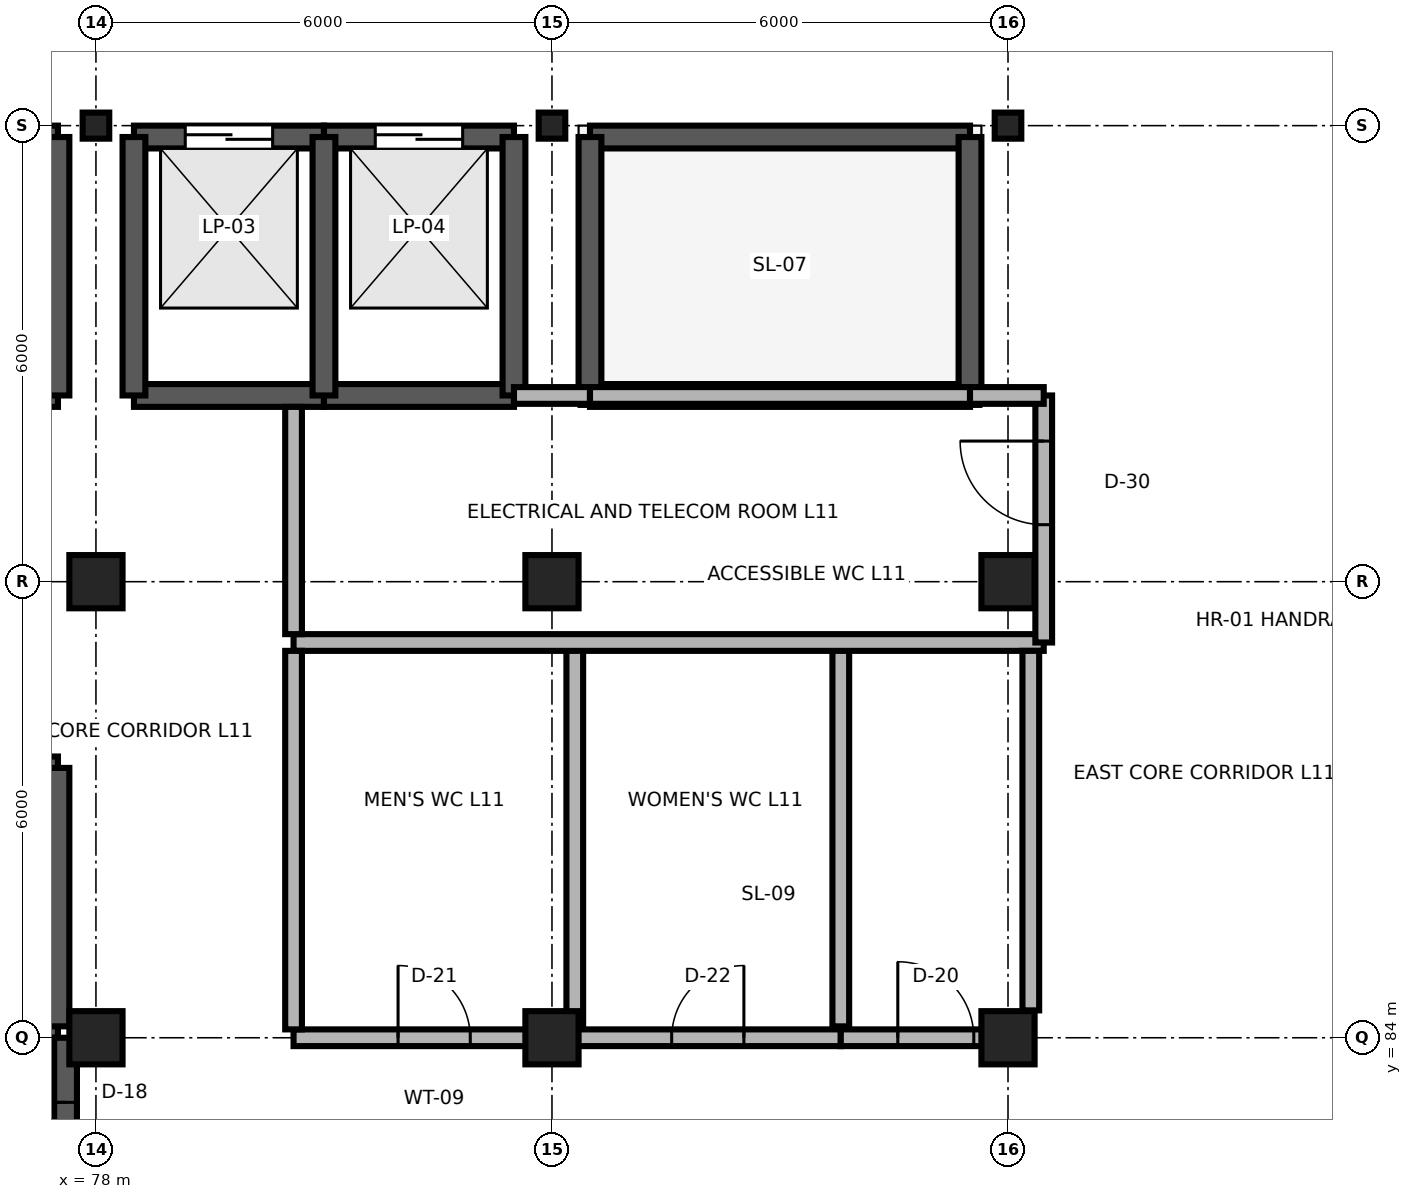
"""IFC4 building model, lengths in metres.
Left out: names, types, materials, properties, quantities, classifications, styles, units other than length and angle.
Written with IfcOpenShell. Run it as: python <this file> out.ifc"""

import sys

from ifc_helpers import new_model, si_unit, direction, frame, frame_2d, origin, origin_2d, place, context, subcontext, project, spatial, rectangle, i_section, extrude, element, fill, save


model = new_model("IFC4")
c1 = context("Model", 3, precision=1e-05, world=origin(), true_north=direction((0.0, 1.0)))
c2 = subcontext(c1, "Body", "Model", "MODEL_VIEW")
j1 = project(units=[si_unit("LENGTHUNIT", "METRE"), si_unit("PLANEANGLEUNIT", "RADIAN")], contexts=[c1])
p1 = place(None, origin())
s1 = spatial("IfcSite", under=j1, at=p1, CompositionType="ELEMENT")
p2 = place(p1, origin())
s2 = spatial("IfcBuilding", under=s1, at=p2, CompositionType="ELEMENT")
p3 = place(p2, frame((0.0, 0.0, 44.4)))
s3 = spatial("IfcBuildingStorey", under=s2, at=p3, CompositionType="ELEMENT", Elevation=44.4)
for number, where, z_axis, x_axis in (
    (1, (78.0, 84.0, 0.0), (0.0, 0.0, 1.0), (1.0, 0.0, 0.0)),
    (2, (84.0, 84.0, 0.0), (0.0, 0.0, 1.0), (1.0, 0.0, 0.0)),
    (3, (90.0, 84.0, 0.0), (0.0, 0.0, 1.0), (1.0, 0.0, 0.0)),
    (4, (78.0, 90.0, 0.0), (0.0, 0.0, 1.0), (1.0, 0.0, 0.0)),
    (5, (84.0, 90.0, 0.0), (0.0, 0.0, 1.0), (1.0, 0.0, 0.0)),
    (6, (90.0, 90.0, 0.0), (0.0, 0.0, 1.0), (1.0, 0.0, 0.0)),
):
    element("IfcColumn", number, at=place(p3, frame(where, z_axis=z_axis, x_axis=x_axis)), inside=s3, PredefinedType="COLUMN", context=c2, shape_type="SweptSolid", body=[
        extrude(rectangle(XDim=0.7, YDim=0.7, at=origin_2d()), origin(), (0.0, 0.0, 1.0), 3.9),
    ])
for number, where, z_axis, x_axis in (
    (7, (78.0, 96.0, 0.0), (0.0, 0.0, 1.0), (1.0, 0.0, 0.0)),
    (8, (84.0, 96.0, 0.0), (0.0, 0.0, 1.0), (1.0, 0.0, 0.0)),
    (9, (90.0, 96.0, 0.0), (0.0, 0.0, 1.0), (1.0, 0.0, 0.0)),
):
    element("IfcColumn", number, at=place(p3, frame(where, z_axis=z_axis, x_axis=x_axis)), inside=s3, PredefinedType="COLUMN", context=c2, shape_type="SweptSolid", body=[
        extrude(i_section(OverallWidth=0.35, OverallDepth=0.343, WebThickness=0.01, FlangeThickness=0.015, FilletRadius=0.02, at=origin_2d()), origin(), (0.0, 0.0, 1.0), 3.9),
    ])
p4 = place(p3, frame((75.0, 84.15, 0.0), z_axis=(0.0, 0.0, 1.0), x_axis=(1.0, 0.0, 0.0)))
e10 = element("IfcWall", 10, at=p4, inside=s3, PredefinedType="SHEAR", context=c2, shape_type="SweptSolid", body=[
    extrude(rectangle(XDim=2.5, YDim=0.3, at=frame_2d((1.25, 0.0))), origin(), (0.0, 0.0, 1.0), 3.74),
])
p5 = place(p4, frame((0.7, 0.0, 0.0)))
e11 = element("IfcOpeningElement", 11, at=p5, cuts=e10, PredefinedType="OPENING", context=c2, shape_type="SweptSolid", body=[
    extrude(rectangle(XDim=1.1, YDim=2.1, at=frame_2d((0.55, 1.05))), frame((0.0, 0.165, 0.0), z_axis=(0.0, -1.0, 0.0), x_axis=(1.0, 0.0, 0.0)), (0.0, 0.0, 1.0), 0.33),
])
p6 = place(p3, frame((75.0, 87.55, 0.0), z_axis=(0.0, 0.0, 1.0), x_axis=(1.0, 0.0, 0.0)))
e12 = element("IfcWall", 12, at=p6, inside=s3, PredefinedType="SHEAR", context=c2, shape_type="SweptSolid", body=[
    extrude(rectangle(XDim=2.5, YDim=0.3, at=frame_2d((1.25, 0.0))), origin(), (0.0, 0.0, 1.0), 3.74),
])
p7 = place(p3, frame((77.5, 84.15, 0.0), z_axis=(0.0, 0.0, 1.0), x_axis=(0.0, 1.0, 0.0)))
e13 = element("IfcWall", 13, at=p7, inside=s3, PredefinedType="SHEAR", context=c2, shape_type="SweptSolid", body=[
    extrude(rectangle(XDim=3.4, YDim=0.3, at=frame_2d((1.7, 0.0))), origin(), (0.0, 0.0, 1.0), 3.74),
])
p8 = place(p3, frame((75.0, 95.85, 0.0), z_axis=(0.0, 0.0, 1.0), x_axis=(1.0, 0.0, 0.0)))
e14 = element("IfcWall", 14, at=p8, inside=s3, PredefinedType="SHEAR", context=c2, shape_type="SweptSolid", body=[
    extrude(rectangle(XDim=2.5, YDim=0.3, at=frame_2d((1.25, 0.0))), origin(), (0.0, 0.0, 1.0), 3.74),
])
p9 = place(p8, frame((0.675, 0.0, 0.0)))
e15 = element("IfcOpeningElement", 15, at=p9, cuts=e14, PredefinedType="OPENING", context=c2, shape_type="SweptSolid", body=[
    extrude(rectangle(XDim=1.15, YDim=2.15, at=frame_2d((0.575, 1.075))), frame((0.0, 0.165, 0.0), z_axis=(0.0, -1.0, 0.0), x_axis=(1.0, 0.0, 0.0)), (0.0, 0.0, 1.0), 0.33),
])
p10 = place(p3, frame((75.0, 92.45, 0.0), z_axis=(0.0, 0.0, 1.0), x_axis=(1.0, 0.0, 0.0)))
e16 = element("IfcWall", 16, at=p10, inside=s3, PredefinedType="SHEAR", context=c2, shape_type="SweptSolid", body=[
    extrude(rectangle(XDim=2.5, YDim=0.3, at=frame_2d((1.25, 0.0))), origin(), (0.0, 0.0, 1.0), 3.74),
])
p11 = place(p3, frame((77.5, 92.45, 0.0), z_axis=(0.0, 0.0, 1.0), x_axis=(0.0, 1.0, 0.0)))
e17 = element("IfcWall", 17, at=p11, inside=s3, PredefinedType="SHEAR", context=c2, shape_type="SweptSolid", body=[
    extrude(rectangle(XDim=3.4, YDim=0.3, at=frame_2d((1.7, 0.0))), origin(), (0.0, 0.0, 1.0), 3.74),
])
p12 = place(p3, frame((78.5, 95.85, 0.0), z_axis=(0.0, 0.0, 1.0), x_axis=(1.0, 0.0, 0.0)))
e18 = element("IfcWall", 18, at=p12, inside=s3, PredefinedType="SHEAR", context=c2, shape_type="SweptSolid", body=[
    extrude(rectangle(XDim=2.5, YDim=0.3, at=frame_2d((1.25, 0.0))), origin(), (0.0, 0.0, 1.0), 3.74),
])
p13 = place(p12, frame((0.675, 0.0, 0.0)))
e19 = element("IfcOpeningElement", 19, at=p13, cuts=e18, PredefinedType="OPENING", context=c2, shape_type="SweptSolid", body=[
    extrude(rectangle(XDim=1.15, YDim=2.15, at=frame_2d((0.575, 1.075))), frame((0.0, 0.165, 0.0), z_axis=(0.0, -1.0, 0.0), x_axis=(1.0, 0.0, 0.0)), (0.0, 0.0, 1.0), 0.33),
])
p14 = place(p3, frame((78.5, 92.45, 0.0), z_axis=(0.0, 0.0, 1.0), x_axis=(1.0, 0.0, 0.0)))
e20 = element("IfcWall", 20, at=p14, inside=s3, PredefinedType="SHEAR", context=c2, shape_type="SweptSolid", body=[
    extrude(rectangle(XDim=2.5, YDim=0.3, at=frame_2d((1.25, 0.0))), origin(), (0.0, 0.0, 1.0), 3.74),
])
p15 = place(p3, frame((78.5, 92.45, 0.0), z_axis=(0.0, 0.0, 1.0), x_axis=(0.0, 1.0, 0.0)))
e21 = element("IfcWall", 21, at=p15, inside=s3, PredefinedType="SHEAR", context=c2, shape_type="SweptSolid", body=[
    extrude(rectangle(XDim=3.4, YDim=0.3, at=frame_2d((1.7, 0.0))), origin(), (0.0, 0.0, 1.0), 3.74),
])
p16 = place(p3, frame((81.0, 95.85, 0.0), z_axis=(0.0, 0.0, 1.0), x_axis=(1.0, 0.0, 0.0)))
e22 = element("IfcWall", 22, at=p16, inside=s3, PredefinedType="SHEAR", context=c2, shape_type="SweptSolid", body=[
    extrude(rectangle(XDim=2.5, YDim=0.3, at=frame_2d((1.25, 0.0))), origin(), (0.0, 0.0, 1.0), 3.74),
])
p17 = place(p16, frame((0.675, 0.0, 0.0)))
e23 = element("IfcOpeningElement", 23, at=p17, cuts=e22, PredefinedType="OPENING", context=c2, shape_type="SweptSolid", body=[
    extrude(rectangle(XDim=1.15, YDim=2.15, at=frame_2d((0.575, 1.075))), frame((0.0, 0.165, 0.0), z_axis=(0.0, -1.0, 0.0), x_axis=(1.0, 0.0, 0.0)), (0.0, 0.0, 1.0), 0.33),
])
p18 = place(p3, frame((81.0, 92.45, 0.0), z_axis=(0.0, 0.0, 1.0), x_axis=(1.0, 0.0, 0.0)))
e24 = element("IfcWall", 24, at=p18, inside=s3, PredefinedType="SHEAR", context=c2, shape_type="SweptSolid", body=[
    extrude(rectangle(XDim=2.5, YDim=0.3, at=frame_2d((1.25, 0.0))), origin(), (0.0, 0.0, 1.0), 3.74),
])
for number, where, z_axis, x_axis in (
    (25, (81.0, 92.45, 0.0), (0.0, 0.0, 1.0), (0.0, 1.0, 0.0)),
    (26, (83.5, 92.45, 0.0), (0.0, 0.0, 1.0), (0.0, 1.0, 0.0)),
):
    element("IfcWall", number, at=place(p3, frame(where, z_axis=z_axis, x_axis=x_axis)), inside=s3, PredefinedType="SHEAR", context=c2, shape_type="SweptSolid", body=[
        extrude(rectangle(XDim=3.4, YDim=0.3, at=frame_2d((1.7, 0.0))), origin(), (0.0, 0.0, 1.0), 3.74),
    ])
for number, where, z_axis, x_axis in (
    (27, (84.5, 92.45, -0.16), (0.0, 0.0, 1.0), (1.0, 0.0, 0.0)),
    (28, (84.5, 95.85, -0.16), (0.0, 0.0, 1.0), (1.0, 0.0, 0.0)),
):
    element("IfcWall", number, at=place(p3, frame(where, z_axis=z_axis, x_axis=x_axis)), inside=s3, PredefinedType="SHEAR", context=c2, shape_type="SweptSolid", body=[
        extrude(rectangle(XDim=5.0, YDim=0.3, at=frame_2d((2.5, 0.0))), origin(), (0.0, 0.0, 1.0), 0.96),
    ])
for number, where, z_axis, x_axis in (
    (29, (84.5, 92.45, -0.16), (0.0, 0.0, 1.0), (0.0, 1.0, 0.0)),
    (30, (89.5, 92.45, -0.16), (0.0, 0.0, 1.0), (0.0, 1.0, 0.0)),
):
    element("IfcWall", number, at=place(p3, frame(where, z_axis=z_axis, x_axis=x_axis)), inside=s3, PredefinedType="SHEAR", context=c2, shape_type="SweptSolid", body=[
        extrude(rectangle(XDim=3.4, YDim=0.3, at=frame_2d((1.7, 0.0))), origin(), (0.0, 0.0, 1.0), 0.96),
    ])
p19 = place(p3, frame((77.6, 81.0, 0.0), z_axis=(0.0, 0.0, 1.0), x_axis=(0.0, 1.0, 0.0)))
e31 = element("IfcWall", 31, at=p19, inside=s3, PredefinedType="SHEAR", context=c2, shape_type="SweptSolid", body=[
    extrude(rectangle(XDim=3.0, YDim=0.3, at=frame_2d((1.5, 0.0))), origin(), (0.0, 0.0, 1.0), 3.74),
])
p20 = place(p19, frame((0.85, 0.0, 0.0)))
e32 = element("IfcOpeningElement", 32, at=p20, cuts=e31, PredefinedType="OPENING", context=c2, shape_type="SweptSolid", body=[
    extrude(rectangle(XDim=1.3, YDim=2.2, at=frame_2d((0.65, 1.1))), frame((0.0, 0.165, 0.0), z_axis=(0.0, -1.0, 0.0), x_axis=(1.0, 0.0, 0.0)), (0.0, 0.0, 1.0), 0.33),
])
p21 = place(p3, frame((80.6, 84.0, 0.0), z_axis=(0.0, 0.0, 1.0), x_axis=(1.0, 0.0, 0.0)))
e33 = element("IfcWall", 33, at=p21, inside=s3, PredefinedType="PARTITIONING", context=c2, shape_type="SweptSolid", body=[
    extrude(rectangle(XDim=3.7, YDim=0.22, at=frame_2d((1.85, 0.0))), origin(), (0.0, 0.0, 1.0), 3.348),
])
p22 = place(p21, frame((1.375, 0.0, 0.0)))
e34 = element("IfcOpeningElement", 34, at=p22, cuts=e33, PredefinedType="OPENING", context=c2, shape_type="SweptSolid", body=[
    extrude(rectangle(XDim=0.95, YDim=2.15, at=frame_2d((0.475, 1.075))), frame((0.0, 0.125, 0.0), z_axis=(0.0, -1.0, 0.0), x_axis=(1.0, 0.0, 0.0)), (0.0, 0.0, 1.0), 0.25),
])
p23 = place(p3, frame((84.3, 84.0, 0.0), z_axis=(0.0, 0.0, 1.0), x_axis=(1.0, 0.0, 0.0)))
e35 = element("IfcWall", 35, at=p23, inside=s3, PredefinedType="PARTITIONING", context=c2, shape_type="SweptSolid", body=[
    extrude(rectangle(XDim=3.5, YDim=0.22, at=frame_2d((1.75, 0.0))), origin(), (0.0, 0.0, 1.0), 3.348),
])
p24 = place(p23, frame((1.275, 0.0, 0.0)))
e36 = element("IfcOpeningElement", 36, at=p24, cuts=e35, PredefinedType="OPENING", context=c2, shape_type="SweptSolid", body=[
    extrude(rectangle(XDim=0.95, YDim=2.1, at=frame_2d((0.475, 1.05))), frame((0.0, 0.125, 0.0), z_axis=(0.0, -1.0, 0.0), x_axis=(1.0, 0.0, 0.0)), (0.0, 0.0, 1.0), 0.25),
])
p25 = place(p3, frame((87.8, 84.0, 0.0), z_axis=(0.0, 0.0, 1.0), x_axis=(1.0, 0.0, 0.0)))
e37 = element("IfcWall", 37, at=p25, inside=s3, PredefinedType="PARTITIONING", context=c2, shape_type="SweptSolid", body=[
    extrude(rectangle(XDim=2.5, YDim=0.22, at=frame_2d((1.25, 0.0))), origin(), (0.0, 0.0, 1.0), 3.348),
])
p26 = place(p25, frame((0.75, 0.0, 0.0)))
e38 = element("IfcOpeningElement", 38, at=p26, cuts=e37, PredefinedType="OPENING", context=c2, shape_type="SweptSolid", body=[
    extrude(rectangle(XDim=1.0, YDim=2.15, at=frame_2d((0.5, 1.075))), frame((0.0, 0.125, 0.0), z_axis=(0.0, -1.0, 0.0), x_axis=(1.0, 0.0, 0.0)), (0.0, 0.0, 1.0), 0.25),
])
for number, where, z_axis, x_axis in (
    (39, (84.3, 84.15, 0.0), (0.0, 0.0, 1.0), (0.0, 1.0, 0.0)),
    (40, (87.8, 84.15, 0.0), (0.0, 0.0, 1.0), (0.0, 1.0, 0.0)),
):
    element("IfcWall", number, at=place(p3, frame(where, z_axis=z_axis, x_axis=x_axis)), inside=s3, PredefinedType="PARTITIONING", context=c2, shape_type="SweptSolid", body=[
        extrude(rectangle(XDim=5.0, YDim=0.22, at=frame_2d((2.5, 0.0))), origin(), (0.0, 0.0, 1.0), 3.74),
    ])
p27 = place(p3, frame((80.6, 89.2, 0.0), z_axis=(0.0, 0.0, 1.0), x_axis=(1.0, 0.0, 0.0)))
e41 = element("IfcWall", 41, at=p27, inside=s3, PredefinedType="PARTITIONING", context=c2, shape_type="SweptSolid", body=[
    extrude(rectangle(XDim=9.87, YDim=0.22, at=frame_2d((4.935, 0.0))), origin(), (0.0, 0.0, 1.0), 3.74),
])
p28 = place(p3, frame((90.47, 89.2, 0.0), z_axis=(0.0, 0.0, 1.0), x_axis=(0.0, 1.0, 0.0)))
e42 = element("IfcWall", 42, at=p28, inside=s3, PredefinedType="PARTITIONING", context=c2, shape_type="SweptSolid", body=[
    extrude(rectangle(XDim=3.25, YDim=0.22, at=frame_2d((1.625, 0.0))), origin(), (0.0, 0.0, 1.0), 3.74),
])
p29 = place(p28, frame((1.55, 0.0, 0.0)))
e43 = element("IfcOpeningElement", 43, at=p29, cuts=e42, PredefinedType="OPENING", context=c2, shape_type="SweptSolid", body=[
    extrude(rectangle(XDim=1.1, YDim=2.15, at=frame_2d((0.55, 1.075))), frame((0.0, 0.125, 0.0), z_axis=(0.0, -1.0, 0.0), x_axis=(1.0, 0.0, 0.0)), (0.0, 0.0, 1.0), 0.25),
])
p30 = place(p3, frame((80.6, 84.11, 0.0), z_axis=(0.0, 0.0, 1.0), x_axis=(0.0, 1.0, 0.0)))
e44 = element("IfcWall", 44, at=p30, inside=s3, PredefinedType="PARTITIONING", context=c2, shape_type="SweptSolid", body=[
    extrude(rectangle(XDim=4.98, YDim=0.22, at=frame_2d((2.49, 0.0))), origin(), (0.0, 0.0, 1.0), 3.74),
])
p31 = place(p3, frame((90.3, 84.36, 0.0), z_axis=(0.0, 0.0, 1.0), x_axis=(0.0, 1.0, 0.0)))
e45 = element("IfcWall", 45, at=p31, inside=s3, PredefinedType="PARTITIONING", context=c2, shape_type="SweptSolid", body=[
    extrude(rectangle(XDim=4.73, YDim=0.22, at=frame_2d((2.365, 0.0))), origin(), (0.0, 0.0, 1.0), 3.74),
])
p32 = place(p3, frame((80.6, 89.31, 0.0), z_axis=(0.0, 0.0, 1.0), x_axis=(0.0, 1.0, 0.0)))
e46 = element("IfcWall", 46, at=p32, inside=s3, PredefinedType="PARTITIONING", context=c2, shape_type="SweptSolid", body=[
    extrude(rectangle(XDim=2.99, YDim=0.22, at=frame_2d((1.495, 0.0))), origin(), (0.0, 0.0, 1.0), 3.74),
])
p33 = place(p3, frame((83.5, 92.45, 0.0), z_axis=(0.0, 0.0, 1.0), x_axis=(1.0, 0.0, 0.0)))
e47 = element("IfcWall", 47, at=p33, inside=s3, PredefinedType="PARTITIONING", context=c2, shape_type="SweptSolid", body=[
    extrude(rectangle(XDim=1.0, YDim=0.22, at=frame_2d((0.5, 0.0))), origin(), (0.0, 0.0, 1.0), 3.74),
])
p34 = place(p3, frame((84.5, 92.45, 0.8), z_axis=(0.0, 0.0, 1.0), x_axis=(1.0, 0.0, 0.0)))
e48 = element("IfcWall", 48, at=p34, inside=s3, PredefinedType="PARTITIONING", context=c2, shape_type="SweptSolid", body=[
    extrude(rectangle(XDim=5.0, YDim=0.22, at=frame_2d((2.5, 0.0))), origin(), (0.0, 0.0, 1.0), 2.94),
])
p35 = place(p3, frame((89.5, 92.45, 0.0), z_axis=(0.0, 0.0, 1.0), x_axis=(1.0, 0.0, 0.0)))
e49 = element("IfcWall", 49, at=p35, inside=s3, PredefinedType="PARTITIONING", context=c2, shape_type="SweptSolid", body=[
    extrude(rectangle(XDim=0.97, YDim=0.22, at=frame_2d((0.485, 0.0))), origin(), (0.0, 0.0, 1.0), 3.74),
])
p36 = place(p13, origin())
e50 = element("IfcDoor", 50, at=p36, inside=s3, OperationType="DOUBLE_DOOR_SLIDING", PredefinedType="DOOR", context=c2, shape_type="SweptSolid", body=[
    extrude(rectangle(XDim=1.15, YDim=2.15, at=frame_2d((0.575, 1.075))), frame((0.0, 0.025, 0.0), z_axis=(0.0, -1.0, 0.0), x_axis=(1.0, 0.0, 0.0)), (0.0, 0.0, 1.0), 0.05),
])
fill(e19, e50)
p37 = place(p17, origin())
e51 = element("IfcDoor", 51, at=p37, inside=s3, OperationType="DOUBLE_DOOR_SLIDING", PredefinedType="DOOR", context=c2, shape_type="SweptSolid", body=[
    extrude(rectangle(XDim=1.15, YDim=2.15, at=frame_2d((0.575, 1.075))), frame((0.0, 0.025, 0.0), z_axis=(0.0, -1.0, 0.0), x_axis=(1.0, 0.0, 0.0)), (0.0, 0.0, 1.0), 0.05),
])
fill(e23, e51)
p38 = place(p20, origin())
e52 = element("IfcDoor", 52, at=p38, inside=s3, OperationType="SINGLE_SWING_RIGHT", PredefinedType="DOOR", context=c2, shape_type="SweptSolid", body=[
    extrude(rectangle(XDim=1.3, YDim=2.2, at=frame_2d((0.65, 1.1))), frame((0.0, 0.025, 0.0), z_axis=(0.0, -1.0, 0.0), x_axis=(1.0, 0.0, 0.0)), (0.0, 0.0, 1.0), 0.05),
])
fill(e32, e52)
p39 = place(p22, origin())
e53 = element("IfcDoor", 53, at=p39, inside=s3, OperationType="SINGLE_SWING_LEFT", PredefinedType="DOOR", context=c2, shape_type="SweptSolid", body=[
    extrude(rectangle(XDim=0.95, YDim=2.15, at=frame_2d((0.475, 1.075))), frame((0.0, 0.025, 0.0), z_axis=(0.0, -1.0, 0.0), x_axis=(1.0, 0.0, 0.0)), (0.0, 0.0, 1.0), 0.05),
])
fill(e34, e53)
p40 = place(p24, origin())
e54 = element("IfcDoor", 54, at=p40, inside=s3, OperationType="SINGLE_SWING_RIGHT", PredefinedType="DOOR", context=c2, shape_type="SweptSolid", body=[
    extrude(rectangle(XDim=0.95, YDim=2.1, at=frame_2d((0.475, 1.05))), frame((0.0, 0.025, 0.0), z_axis=(0.0, -1.0, 0.0), x_axis=(1.0, 0.0, 0.0)), (0.0, 0.0, 1.0), 0.05),
])
fill(e36, e54)
p41 = place(p26, origin())
e55 = element("IfcDoor", 55, at=p41, inside=s3, OperationType="SINGLE_SWING_LEFT", PredefinedType="DOOR", context=c2, shape_type="SweptSolid", body=[
    extrude(rectangle(XDim=1.0, YDim=2.15, at=frame_2d((0.5, 1.075))), frame((0.0, 0.025, 0.0), z_axis=(0.0, -1.0, 0.0), x_axis=(1.0, 0.0, 0.0)), (0.0, 0.0, 1.0), 0.05),
])
fill(e38, e55)
p42 = place(p29, origin())
e56 = element("IfcDoor", 56, at=p42, inside=s3, OperationType="SINGLE_SWING_RIGHT", PredefinedType="DOOR", context=c2, shape_type="SweptSolid", body=[
    extrude(rectangle(XDim=1.1, YDim=2.15, at=frame_2d((0.55, 1.075))), frame((0.0, 0.025, 0.0), z_axis=(0.0, -1.0, 0.0), x_axis=(1.0, 0.0, 0.0)), (0.0, 0.0, 1.0), 0.05),
])
fill(e43, e56)
save(model, sys.argv[1])
